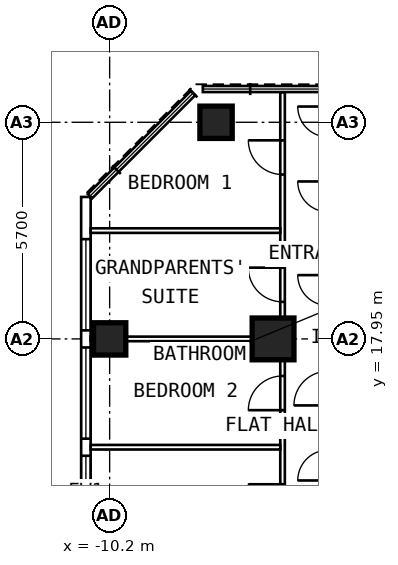
"""IFC4 building model, lengths in metres.
Left out: names, types, materials, properties, quantities, classifications, styles, units other than length and angle.
Written with IfcOpenShell. Run it as: python <this file> out.ifc"""

import sys

from ifc_helpers import new_model, si_unit, direction, frame, frame_2d, origin, origin_2d, place, context, subcontext, project, spatial, rectangle, extrude, element, fill, save


model = new_model("IFC4")
c1 = context("Model", 3, precision=1e-05, world=origin(), true_north=direction((0.0, 1.0)))
c2 = subcontext(c1, "Body", "Model", "MODEL_VIEW")
j1 = project(units=[si_unit("LENGTHUNIT", "METRE"), si_unit("PLANEANGLEUNIT", "RADIAN")], contexts=[c1])
p1 = place(None, origin())
s1 = spatial("IfcSite", under=j1, at=p1, CompositionType="ELEMENT")
p2 = place(p1, origin())
s2 = spatial("IfcBuilding", under=s1, at=p2, CompositionType="ELEMENT")
p3 = place(p2, frame((0.0, 0.0, 246.0)))
s3 = spatial("IfcBuildingStorey", under=s2, at=p3, CompositionType="ELEMENT", Elevation=246.0)
for number, where, z_axis, x_axis in (
    (1, (-10.2, 17.95, 0.0), (0.0, 0.0, 1.0), (0.0, 1.0, 0.0)),
    (2, (-7.4, 23.65, 0.0), (0.0, 0.0, 1.0), (0.0, 1.0, 0.0)),
):
    element("IfcColumn", number, at=place(p3, frame(where, z_axis=z_axis, x_axis=x_axis)), inside=s3, PredefinedType="COLUMN", context=c2, shape_type="SweptSolid", body=[
        extrude(rectangle(XDim=0.85, YDim=0.85, at=origin_2d()), origin(), (0.0, 0.0, 1.0), 3.6),
    ])
p4 = place(p3, frame((-5.9, 17.95, 0.0), z_axis=(0.0, 0.0, 1.0), x_axis=(0.0, 1.0, 0.0)))
e3 = element("IfcColumn", 3, at=p4, inside=s3, PredefinedType="COLUMN", context=c2, shape_type="SweptSolid", body=[
    extrude(rectangle(XDim=1.1, YDim=1.1, at=origin_2d()), origin(), (0.0, 0.0, 1.0), 3.6),
])
p5 = place(p3, frame((-10.825, 6.148, 0.0), z_axis=(0.0, 0.0, 1.0), x_axis=(0.0, 1.0, 0.0)))
e4 = element("IfcWall", 4, at=p5, inside=s3, PredefinedType="SOLIDWALL", context=c2, shape_type="SweptSolid", body=[
    extrude(rectangle(XDim=15.537, YDim=0.25, at=frame_2d((7.769, 0.0))), origin(), (0.0, 0.0, 1.0), 3.35),
])
p6 = place(p5, frame((0.627, 0.0, 0.8)))
e5 = element("IfcOpeningElement", 5, at=p6, cuts=e4, PredefinedType="OPENING", context=c2, shape_type="SweptSolid", body=[
    extrude(rectangle(XDim=2.4, YDim=1.8, at=frame_2d((1.2, 0.9))), frame((0.0, 0.137, 0.0), z_axis=(0.0, -1.0, 0.0), x_axis=(1.0, 0.0, 0.0)), (0.0, 0.0, 1.0), 0.274),
])
p7 = place(p5, frame((3.477, 0.0, 0.8)))
e6 = element("IfcOpeningElement", 6, at=p7, cuts=e4, PredefinedType="OPENING", context=c2, shape_type="SweptSolid", body=[
    extrude(rectangle(XDim=2.4, YDim=1.8, at=frame_2d((1.2, 0.9))), frame((0.0, 0.137, 0.0), z_axis=(0.0, -1.0, 0.0), x_axis=(1.0, 0.0, 0.0)), (0.0, 0.0, 1.0), 0.274),
])
p8 = place(p5, frame((6.327, 0.0, 0.8)))
e7 = element("IfcOpeningElement", 7, at=p8, cuts=e4, PredefinedType="OPENING", context=c2, shape_type="SweptSolid", body=[
    extrude(rectangle(XDim=2.4, YDim=1.8, at=frame_2d((1.2, 0.9))), frame((0.0, 0.137, 0.0), z_axis=(0.0, -1.0, 0.0), x_axis=(1.0, 0.0, 0.0)), (0.0, 0.0, 1.0), 0.274),
])
p9 = place(p5, frame((9.177, 0.0, 0.8)))
e8 = element("IfcOpeningElement", 8, at=p9, cuts=e4, PredefinedType="OPENING", context=c2, shape_type="SweptSolid", body=[
    extrude(rectangle(XDim=2.4, YDim=1.8, at=frame_2d((1.2, 0.9))), frame((0.0, 0.137, 0.0), z_axis=(0.0, -1.0, 0.0), x_axis=(1.0, 0.0, 0.0)), (0.0, 0.0, 1.0), 0.274),
])
p10 = place(p5, frame((12.027, 0.0, 0.8)))
e9 = element("IfcOpeningElement", 9, at=p10, cuts=e4, PredefinedType="OPENING", context=c2, shape_type="SweptSolid", body=[
    extrude(rectangle(XDim=2.4, YDim=1.8, at=frame_2d((1.2, 0.9))), frame((0.0, 0.137, 0.0), z_axis=(0.0, -1.0, 0.0), x_axis=(1.0, 0.0, 0.0)), (0.0, 0.0, 1.0), 0.274),
])
p11 = place(p3, frame((-5.65, 9.6, 0.0), z_axis=(0.0, 0.0, 1.0), x_axis=(0.0, 1.0, 0.0)))
e10 = element("IfcWall", 10, at=p11, inside=s3, PredefinedType="PARTITIONING", context=c2, shape_type="SweptSolid", body=[
    extrude(rectangle(XDim=14.845, YDim=0.12, at=frame_2d((7.422, 0.0))), origin(), (0.0, 0.0, 1.0), 3.35),
])
p12 = place(p11, frame((1.05, 0.0, 0.0)))
e11 = element("IfcOpeningElement", 11, at=p12, cuts=e10, PredefinedType="OPENING", context=c2, shape_type="SweptSolid", body=[
    extrude(rectangle(XDim=0.9, YDim=2.1, at=frame_2d((0.45, 1.05))), frame((0.0, 0.072, 0.0), z_axis=(0.0, -1.0, 0.0), x_axis=(1.0, 0.0, 0.0)), (0.0, 0.0, 1.0), 0.144),
])
p13 = place(p11, frame((3.625, 0.0, 0.0)))
e12 = element("IfcOpeningElement", 12, at=p13, cuts=e10, PredefinedType="OPENING", context=c2, shape_type="SweptSolid", body=[
    extrude(rectangle(XDim=0.9, YDim=2.1, at=frame_2d((0.45, 1.05))), frame((0.0, 0.072, 0.0), z_axis=(0.0, -1.0, 0.0), x_axis=(1.0, 0.0, 0.0)), (0.0, 0.0, 1.0), 0.144),
])
p14 = place(p11, frame((6.475, 0.0, 0.0)))
e13 = element("IfcOpeningElement", 13, at=p14, cuts=e10, PredefinedType="OPENING", context=c2, shape_type="SweptSolid", body=[
    extrude(rectangle(XDim=0.9, YDim=2.1, at=frame_2d((0.45, 1.05))), frame((0.0, 0.072, 0.0), z_axis=(0.0, -1.0, 0.0), x_axis=(1.0, 0.0, 0.0)), (0.0, 0.0, 1.0), 0.144),
])
p15 = place(p11, frame((9.325, 0.0, 0.0)))
e14 = element("IfcOpeningElement", 14, at=p15, cuts=e10, PredefinedType="OPENING", context=c2, shape_type="SweptSolid", body=[
    extrude(rectangle(XDim=0.9, YDim=2.1, at=frame_2d((0.45, 1.05))), frame((0.0, 0.072, 0.0), z_axis=(0.0, -1.0, 0.0), x_axis=(1.0, 0.0, 0.0)), (0.0, 0.0, 1.0), 0.144),
])
p16 = place(p11, frame((12.675, 0.0, 0.0)))
e15 = element("IfcOpeningElement", 15, at=p16, cuts=e10, PredefinedType="OPENING", context=c2, shape_type="SweptSolid", body=[
    extrude(rectangle(XDim=0.9, YDim=2.1, at=frame_2d((0.45, 1.05))), frame((0.0, 0.072, 0.0), z_axis=(0.0, -1.0, 0.0), x_axis=(1.0, 0.0, 0.0)), (0.0, 0.0, 1.0), 0.144),
])
p17 = place(p3, frame((-5.71, 15.1, 0.0), z_axis=(0.0, 0.0, 1.0), x_axis=(-1.0, 0.0, 0.0)))
e16 = element("IfcWall", 16, at=p17, inside=s3, PredefinedType="PARTITIONING", context=c2, shape_type="SweptSolid", body=[
    extrude(rectangle(XDim=4.99, YDim=0.12, at=frame_2d((2.495, 0.0))), origin(), (0.0, 0.0, 1.0), 3.35),
])
p18 = place(p3, frame((-5.71, 17.95, 0.0), z_axis=(0.0, 0.0, 1.0), x_axis=(-1.0, 0.0, 0.0)))
e17 = element("IfcWall", 17, at=p18, inside=s3, PredefinedType="PARTITIONING", context=c2, shape_type="SweptSolid", body=[
    extrude(rectangle(XDim=4.99, YDim=0.12, at=frame_2d((2.495, 0.0))), origin(), (0.0, 0.0, 1.0), 2.45),
])
p19 = place(p3, frame((-5.71, 20.8, 0.0), z_axis=(0.0, 0.0, 1.0), x_axis=(-1.0, 0.0, 0.0)))
e18 = element("IfcWall", 18, at=p19, inside=s3, PredefinedType="PARTITIONING", context=c2, shape_type="SweptSolid", body=[
    extrude(rectangle(XDim=4.99, YDim=0.12, at=frame_2d((2.495, 0.0))), origin(), (0.0, 0.0, 1.0), 3.35),
])
p20 = place(p8, origin())
e19 = element("IfcWindow", 19, at=p20, inside=s3, PartitioningType="SINGLE_PANEL", PredefinedType="WINDOW", context=c2, shape_type="SweptSolid", body=[
    extrude(rectangle(XDim=2.4, YDim=1.8, at=frame_2d((1.2, 0.9))), frame((0.0, 0.03, 0.0), z_axis=(0.0, -1.0, 0.0), x_axis=(1.0, 0.0, 0.0)), (0.0, 0.0, 1.0), 0.06),
])
fill(e7, e19)
p21 = place(p9, origin())
e20 = element("IfcWindow", 20, at=p21, inside=s3, PartitioningType="SINGLE_PANEL", PredefinedType="WINDOW", context=c2, shape_type="SweptSolid", body=[
    extrude(rectangle(XDim=2.4, YDim=1.8, at=frame_2d((1.2, 0.9))), frame((0.0, 0.03, 0.0), z_axis=(0.0, -1.0, 0.0), x_axis=(1.0, 0.0, 0.0)), (0.0, 0.0, 1.0), 0.06),
])
fill(e8, e20)
p22 = place(p10, origin())
e21 = element("IfcWindow", 21, at=p22, inside=s3, PartitioningType="SINGLE_PANEL", PredefinedType="WINDOW", context=c2, shape_type="SweptSolid", body=[
    extrude(rectangle(XDim=2.4, YDim=1.8, at=frame_2d((1.2, 0.9))), frame((0.0, 0.03, 0.0), z_axis=(0.0, -1.0, 0.0), x_axis=(1.0, 0.0, 0.0)), (0.0, 0.0, 1.0), 0.06),
])
fill(e9, e21)
p23 = place(p13, origin())
e22 = element("IfcDoor", 22, at=p23, inside=s3, OperationType="SINGLE_SWING_RIGHT", PredefinedType="DOOR", context=c2, shape_type="SweptSolid", body=[
    extrude(rectangle(XDim=0.9, YDim=2.1, at=frame_2d((0.45, 1.05))), frame((0.0, 0.025, 0.0), z_axis=(0.0, -1.0, 0.0), x_axis=(1.0, 0.0, 0.0)), (0.0, 0.0, 1.0), 0.05),
])
fill(e12, e22)
p24 = place(p14, origin())
e23 = element("IfcDoor", 23, at=p24, inside=s3, OperationType="SINGLE_SWING_LEFT", PredefinedType="DOOR", context=c2, shape_type="SweptSolid", body=[
    extrude(rectangle(XDim=0.9, YDim=2.1, at=frame_2d((0.45, 1.05))), frame((0.0, 0.025, 0.0), z_axis=(0.0, -1.0, 0.0), x_axis=(1.0, 0.0, 0.0)), (0.0, 0.0, 1.0), 0.05),
])
fill(e13, e23)
p25 = place(p15, origin())
e24 = element("IfcDoor", 24, at=p25, inside=s3, OperationType="SINGLE_SWING_RIGHT", PredefinedType="DOOR", context=c2, shape_type="SweptSolid", body=[
    extrude(rectangle(XDim=0.9, YDim=2.1, at=frame_2d((0.45, 1.05))), frame((0.0, 0.025, 0.0), z_axis=(0.0, -1.0, 0.0), x_axis=(1.0, 0.0, 0.0)), (0.0, 0.0, 1.0), 0.05),
])
fill(e14, e24)
p26 = place(p16, origin())
e25 = element("IfcDoor", 25, at=p26, inside=s3, OperationType="SINGLE_SWING_RIGHT", PredefinedType="DOOR", context=c2, shape_type="SweptSolid", body=[
    extrude(rectangle(XDim=0.9, YDim=2.1, at=frame_2d((0.45, 1.05))), frame((0.0, 0.025, 0.0), z_axis=(0.0, -1.0, 0.0), x_axis=(1.0, 0.0, 0.0)), (0.0, 0.0, 1.0), 0.05),
])
fill(e15, e25)
save(model, sys.argv[1])
